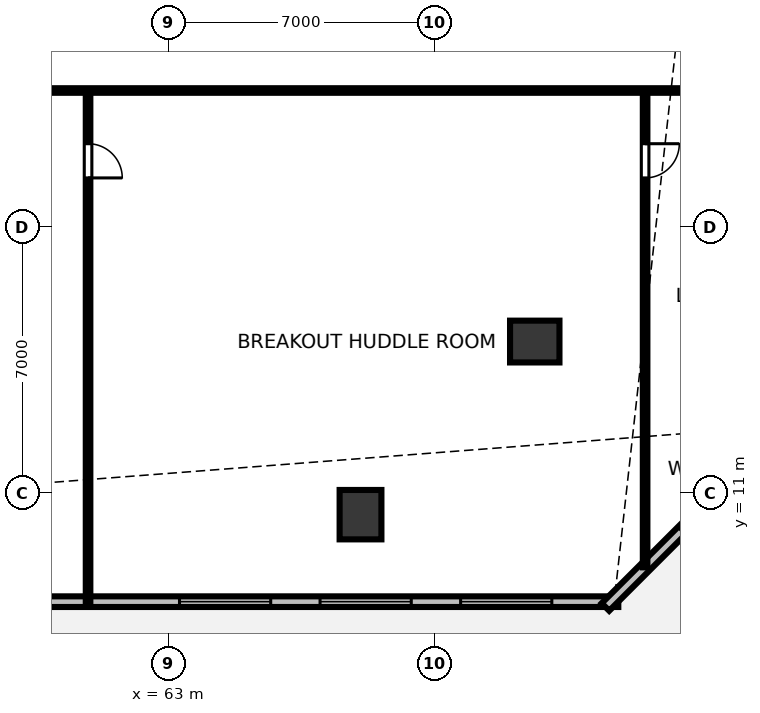
"""IFC4 building model, lengths in metres.
Left out: names, types, materials, properties, quantities, classifications, styles, units other than length and angle.
Written with IfcOpenShell. Run it as: python <this file> out.ifc"""

import sys

from ifc_helpers import new_model, si_unit, direction, frame, frame_2d, origin, origin_2d, place, context, subcontext, project, spatial, rectangle, hollow_rectangle, extrude, element, fill, save


model = new_model("IFC4")
c1 = context("Model", 3, precision=1e-05, world=origin(), true_north=direction((0.0, 1.0)))
c2 = subcontext(c1, "Body", "Model", "MODEL_VIEW")
j1 = project(units=[si_unit("LENGTHUNIT", "METRE"), si_unit("PLANEANGLEUNIT", "RADIAN")], contexts=[c1])
p1 = place(None, origin())
s1 = spatial("IfcSite", under=j1, at=p1, CompositionType="ELEMENT")
p2 = place(p1, origin())
s2 = spatial("IfcBuilding", under=s1, at=p2, CompositionType="ELEMENT")
p3 = place(p2, frame((0.0, 0.0, 14.0)))
s3 = spatial("IfcBuildingStorey", under=s2, at=p3, CompositionType="ELEMENT", Elevation=14.0)
for number, where, z_axis, x_axis in (
    (1, (68.057, 10.429, 0.0), (0.0, 0.0, 1.0), (1.0, 0.0, 0.0)),
    (2, (72.642, 14.984, 0.0), (0.0, 0.0, 1.0), (0.0, 1.0, 0.0)),
):
    element("IfcColumn", number, at=place(p3, frame(where, z_axis=z_axis, x_axis=x_axis)), inside=s3, PredefinedType="COLUMN", context=c2, shape_type="SweptSolid", body=[
        extrude(hollow_rectangle(XDim=1.1, YDim=1.3, WallThickness=0.07, at=origin_2d()), origin(), (0.0, 0.0, 1.0), 4.208),
    ])
p4 = place(p3, frame((17.16, 8.14, 0.0), z_axis=(0.0, 0.0, 1.0), x_axis=(1.0, 0.0, 0.0)))
e3 = element("IfcWall", 3, at=p4, inside=s3, PredefinedType="STANDARD", context=c2, shape_type="SweptSolid", body=[
    extrude(rectangle(XDim=57.68, YDim=0.28, at=frame_2d((28.84, 0.0))), origin(), (0.0, 0.0, 1.0), 4.21),
])
p5 = place(p4, frame((1.749, 0.0, 0.85)))
e4 = element("IfcOpeningElement", 4, at=p5, cuts=e3, PredefinedType="OPENING", context=c2, shape_type="SweptSolid", body=[
    extrude(rectangle(XDim=2.4, YDim=2.4, at=frame_2d((1.2, 1.2))), frame((0.0, 0.15, 0.0), z_axis=(0.0, -1.0, 0.0), x_axis=(1.0, 0.0, 0.0)), (0.0, 0.0, 1.0), 0.3),
])
p6 = place(p4, frame((5.448, 0.0, 0.85)))
e5 = element("IfcOpeningElement", 5, at=p6, cuts=e3, PredefinedType="OPENING", context=c2, shape_type="SweptSolid", body=[
    extrude(rectangle(XDim=2.4, YDim=2.4, at=frame_2d((1.2, 1.2))), frame((0.0, 0.15, 0.0), z_axis=(0.0, -1.0, 0.0), x_axis=(1.0, 0.0, 0.0)), (0.0, 0.0, 1.0), 0.3),
])
p7 = place(p4, frame((9.147, 0.0, 0.85)))
e6 = element("IfcOpeningElement", 6, at=p7, cuts=e3, PredefinedType="OPENING", context=c2, shape_type="SweptSolid", body=[
    extrude(rectangle(XDim=2.4, YDim=2.4, at=frame_2d((1.2, 1.2))), frame((0.0, 0.15, 0.0), z_axis=(0.0, -1.0, 0.0), x_axis=(1.0, 0.0, 0.0)), (0.0, 0.0, 1.0), 0.3),
])
p8 = place(p4, frame((12.845, 0.0, 0.85)))
e7 = element("IfcOpeningElement", 7, at=p8, cuts=e3, PredefinedType="OPENING", context=c2, shape_type="SweptSolid", body=[
    extrude(rectangle(XDim=2.4, YDim=2.4, at=frame_2d((1.2, 1.2))), frame((0.0, 0.15, 0.0), z_axis=(0.0, -1.0, 0.0), x_axis=(1.0, 0.0, 0.0)), (0.0, 0.0, 1.0), 0.3),
])
p9 = place(p4, frame((16.544, 0.0, 0.85)))
e8 = element("IfcOpeningElement", 8, at=p9, cuts=e3, PredefinedType="OPENING", context=c2, shape_type="SweptSolid", body=[
    extrude(rectangle(XDim=2.4, YDim=2.4, at=frame_2d((1.2, 1.2))), frame((0.0, 0.15, 0.0), z_axis=(0.0, -1.0, 0.0), x_axis=(1.0, 0.0, 0.0)), (0.0, 0.0, 1.0), 0.3),
])
p10 = place(p4, frame((23.941, 0.0, 0.85)))
e9 = element("IfcOpeningElement", 9, at=p10, cuts=e3, PredefinedType="OPENING", context=c2, shape_type="SweptSolid", body=[
    extrude(rectangle(XDim=2.4, YDim=2.4, at=frame_2d((1.2, 1.2))), frame((0.0, 0.15, 0.0), z_axis=(0.0, -1.0, 0.0), x_axis=(1.0, 0.0, 0.0)), (0.0, 0.0, 1.0), 0.3),
])
p11 = place(p4, frame((27.64, 0.0, 0.85)))
e10 = element("IfcOpeningElement", 10, at=p11, cuts=e3, PredefinedType="OPENING", context=c2, shape_type="SweptSolid", body=[
    extrude(rectangle(XDim=2.4, YDim=2.4, at=frame_2d((1.2, 1.2))), frame((0.0, 0.15, 0.0), z_axis=(0.0, -1.0, 0.0), x_axis=(1.0, 0.0, 0.0)), (0.0, 0.0, 1.0), 0.3),
])
p12 = place(p4, frame((31.339, 0.0, 0.85)))
e11 = element("IfcOpeningElement", 11, at=p12, cuts=e3, PredefinedType="OPENING", context=c2, shape_type="SweptSolid", body=[
    extrude(rectangle(XDim=2.4, YDim=2.4, at=frame_2d((1.2, 1.2))), frame((0.0, 0.15, 0.0), z_axis=(0.0, -1.0, 0.0), x_axis=(1.0, 0.0, 0.0)), (0.0, 0.0, 1.0), 0.3),
])
p13 = place(p4, frame((35.037, 0.0, 0.85)))
e12 = element("IfcOpeningElement", 12, at=p13, cuts=e3, PredefinedType="OPENING", context=c2, shape_type="SweptSolid", body=[
    extrude(rectangle(XDim=2.4, YDim=2.4, at=frame_2d((1.2, 1.2))), frame((0.0, 0.15, 0.0), z_axis=(0.0, -1.0, 0.0), x_axis=(1.0, 0.0, 0.0)), (0.0, 0.0, 1.0), 0.3),
])
p14 = place(p4, frame((38.736, 0.0, 0.85)))
e13 = element("IfcOpeningElement", 13, at=p14, cuts=e3, PredefinedType="OPENING", context=c2, shape_type="SweptSolid", body=[
    extrude(rectangle(XDim=2.4, YDim=2.4, at=frame_2d((1.2, 1.2))), frame((0.0, 0.15, 0.0), z_axis=(0.0, -1.0, 0.0), x_axis=(1.0, 0.0, 0.0)), (0.0, 0.0, 1.0), 0.3),
])
p15 = place(p4, frame((46.133, 0.0, 0.85)))
e14 = element("IfcOpeningElement", 14, at=p15, cuts=e3, PredefinedType="OPENING", context=c2, shape_type="SweptSolid", body=[
    extrude(rectangle(XDim=2.4, YDim=2.4, at=frame_2d((1.2, 1.2))), frame((0.0, 0.15, 0.0), z_axis=(0.0, -1.0, 0.0), x_axis=(1.0, 0.0, 0.0)), (0.0, 0.0, 1.0), 0.3),
])
p16 = place(p4, frame((49.832, 0.0, 0.85)))
e15 = element("IfcOpeningElement", 15, at=p16, cuts=e3, PredefinedType="OPENING", context=c2, shape_type="SweptSolid", body=[
    extrude(rectangle(XDim=2.4, YDim=2.4, at=frame_2d((1.2, 1.2))), frame((0.0, 0.15, 0.0), z_axis=(0.0, -1.0, 0.0), x_axis=(1.0, 0.0, 0.0)), (0.0, 0.0, 1.0), 0.3),
])
p17 = place(p4, frame((53.531, 0.0, 0.85)))
e16 = element("IfcOpeningElement", 16, at=p17, cuts=e3, PredefinedType="OPENING", context=c2, shape_type="SweptSolid", body=[
    extrude(rectangle(XDim=2.4, YDim=2.4, at=frame_2d((1.2, 1.2))), frame((0.0, 0.15, 0.0), z_axis=(0.0, -1.0, 0.0), x_axis=(1.0, 0.0, 0.0)), (0.0, 0.0, 1.0), 0.3),
])
p18 = place(p3, frame((74.502, 8.0, 0.0), z_axis=(0.0, 0.0, 1.0), x_axis=(0.707106781187, 0.707106781187, 0.0)))
e17 = element("IfcWall", 17, at=p18, inside=s3, PredefinedType="STANDARD", context=c2, shape_type="SweptSolid", body=[
    extrude(rectangle(XDim=7.068, YDim=0.28, at=frame_2d((3.534, 0.0))), origin(), (0.0, 0.0, 1.0), 4.21),
])
p19 = place(p18, frame((2.834, 0.0, 1.5)))
e18 = element("IfcOpeningElement", 18, at=p19, cuts=e17, PredefinedType="OPENING", context=c2, shape_type="SweptSolid", body=[
    extrude(rectangle(XDim=1.4, YDim=1.2, at=frame_2d((0.7, 0.6))), frame((0.0, 0.15, 0.0), z_axis=(0.0, -1.0, 0.0), x_axis=(1.0, 0.0, 0.0)), (0.0, 0.0, 1.0), 0.3),
])
p20 = place(p3, frame((60.887, 21.59, 0.0), z_axis=(0.0, 0.0, 1.0), x_axis=(0.0, -1.0, 0.0)))
e19 = element("IfcWall", 19, at=p20, inside=s3, PredefinedType="PARTITIONING", context=c2, shape_type="SweptSolid", body=[
    extrude(rectangle(XDim=13.45, YDim=0.12, at=frame_2d((6.725, 0.0))), origin(), (0.0, 0.0, 1.0), 3.31),
])
p21 = place(p20, frame((1.4, 0.0, 0.0)))
e20 = element("IfcOpeningElement", 20, at=p21, cuts=e19, PredefinedType="OPENING", context=c2, shape_type="SweptSolid", body=[
    extrude(rectangle(XDim=0.9, YDim=2.15, at=frame_2d((0.45, 1.075))), frame((0.0, 0.07, 0.0), z_axis=(0.0, -1.0, 0.0), x_axis=(1.0, 0.0, 0.0)), (0.0, 0.0, 1.0), 0.14),
])
p22 = place(p3, frame((75.545, 21.59, 0.0), z_axis=(0.0, 0.0, 1.0), x_axis=(0.0, -1.0, 0.0)))
e21 = element("IfcWall", 21, at=p22, inside=s3, PredefinedType="PARTITIONING", context=c2, shape_type="SweptSolid", body=[
    extrude(rectangle(XDim=12.547, YDim=0.12, at=frame_2d((6.273, 0.0))), origin(), (0.0, 0.0, 1.0), 3.31),
])
p23 = place(p22, frame((1.4, 0.0, 0.0)))
e22 = element("IfcOpeningElement", 22, at=p23, cuts=e21, PredefinedType="OPENING", context=c2, shape_type="SweptSolid", body=[
    extrude(rectangle(XDim=0.9, YDim=2.15, at=frame_2d((0.45, 1.075))), frame((0.0, 0.07, 0.0), z_axis=(0.0, -1.0, 0.0), x_axis=(1.0, 0.0, 0.0)), (0.0, 0.0, 1.0), 0.14),
])
p24 = place(p3, frame((57.35, 21.59, 0.0), z_axis=(0.0, 0.0, 1.0), x_axis=(1.0, 0.0, 0.0)))
e23 = element("IfcWall", 23, at=p24, inside=s3, PredefinedType="PARTITIONING", context=c2, shape_type="SweptSolid", body=[
    extrude(rectangle(XDim=22.01, YDim=0.12, at=frame_2d((11.005, 0.0))), origin(), (0.0, 0.0, 1.0), 3.31),
])
p25 = place(p15, origin())
e24 = element("IfcWindow", 24, at=p25, inside=s3, PartitioningType="SINGLE_PANEL", PredefinedType="WINDOW", context=c2, shape_type="SweptSolid", body=[
    extrude(rectangle(XDim=2.4, YDim=2.4, at=frame_2d((1.2, 1.2))), frame((0.0, 0.03, 0.0), z_axis=(0.0, -1.0, 0.0), x_axis=(1.0, 0.0, 0.0)), (0.0, 0.0, 1.0), 0.06),
])
fill(e14, e24)
p26 = place(p16, origin())
e25 = element("IfcWindow", 25, at=p26, inside=s3, PartitioningType="SINGLE_PANEL", PredefinedType="WINDOW", context=c2, shape_type="SweptSolid", body=[
    extrude(rectangle(XDim=2.4, YDim=2.4, at=frame_2d((1.2, 1.2))), frame((0.0, 0.03, 0.0), z_axis=(0.0, -1.0, 0.0), x_axis=(1.0, 0.0, 0.0)), (0.0, 0.0, 1.0), 0.06),
])
fill(e15, e25)
p27 = place(p17, origin())
e26 = element("IfcWindow", 26, at=p27, inside=s3, PartitioningType="SINGLE_PANEL", PredefinedType="WINDOW", context=c2, shape_type="SweptSolid", body=[
    extrude(rectangle(XDim=2.4, YDim=2.4, at=frame_2d((1.2, 1.2))), frame((0.0, 0.03, 0.0), z_axis=(0.0, -1.0, 0.0), x_axis=(1.0, 0.0, 0.0)), (0.0, 0.0, 1.0), 0.06),
])
fill(e16, e26)
p28 = place(p19, origin())
e27 = element("IfcWindow", 27, at=p28, inside=s3, PartitioningType="SINGLE_PANEL", PredefinedType="WINDOW", context=c2, shape_type="SweptSolid", body=[
    extrude(rectangle(XDim=1.4, YDim=1.2, at=frame_2d((0.7, 0.6))), frame((0.0, 0.03, 0.0), z_axis=(0.0, -1.0, 0.0), x_axis=(1.0, 0.0, 0.0)), (0.0, 0.0, 1.0), 0.06),
])
fill(e18, e27)
p29 = place(p21, origin())
e28 = element("IfcDoor", 28, at=p29, inside=s3, OperationType="SINGLE_SWING_RIGHT", PredefinedType="DOOR", context=c2, shape_type="SweptSolid", body=[
    extrude(rectangle(XDim=0.9, YDim=2.15, at=frame_2d((0.45, 1.075))), frame((0.0, 0.025, 0.0), z_axis=(0.0, -1.0, 0.0), x_axis=(1.0, 0.0, 0.0)), (0.0, 0.0, 1.0), 0.05),
])
fill(e20, e28)
p30 = place(p23, origin())
e29 = element("IfcDoor", 29, at=p30, inside=s3, OperationType="SINGLE_SWING_LEFT", PredefinedType="DOOR", context=c2, shape_type="SweptSolid", body=[
    extrude(rectangle(XDim=0.9, YDim=2.15, at=frame_2d((0.45, 1.075))), frame((0.0, 0.025, 0.0), z_axis=(0.0, -1.0, 0.0), x_axis=(1.0, 0.0, 0.0)), (0.0, 0.0, 1.0), 0.05),
])
fill(e22, e29)
save(model, sys.argv[1])
